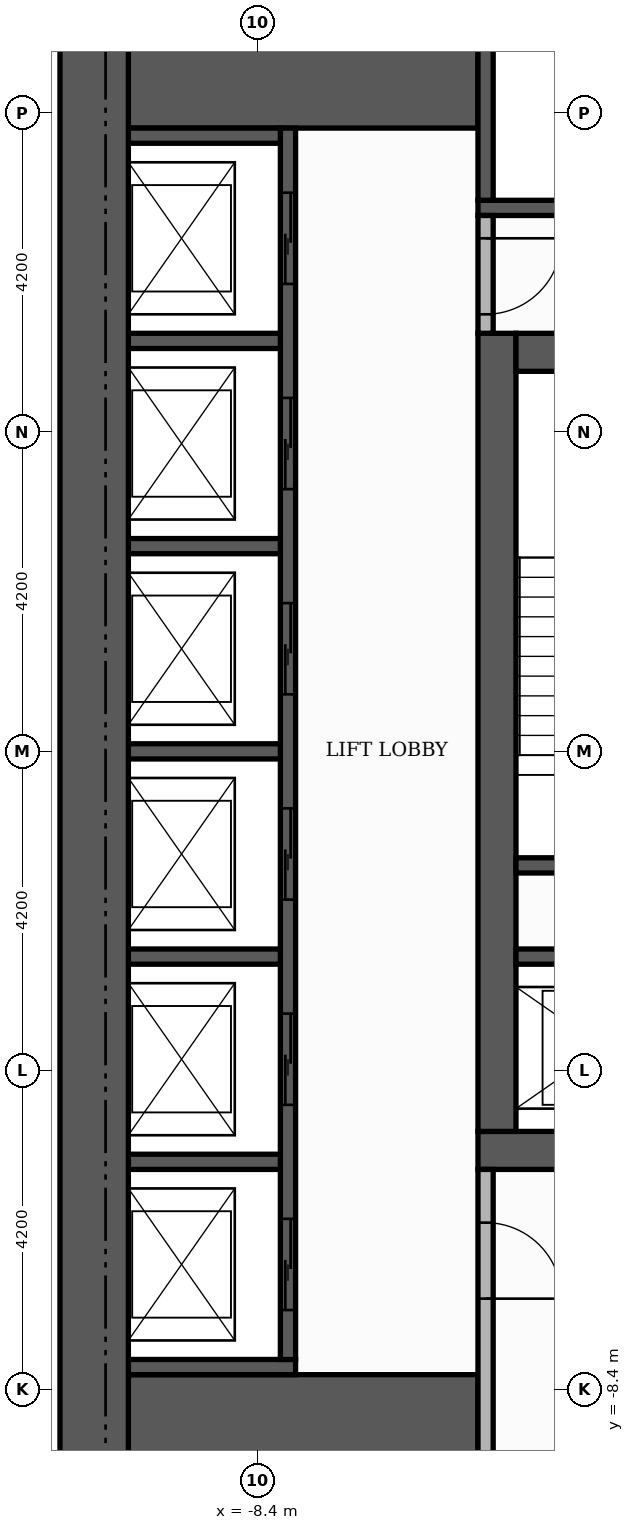
"""IFC4 building model, lengths in metres.
Left out: names, types, materials, properties, quantities, classifications, styles, units other than length and angle.
Written with IfcOpenShell. Run it as: python <this file> out.ifc"""

import sys

from ifc_helpers import new_model, si_unit, direction, frame, frame_2d, origin, place, context, subcontext, project, spatial, rectangle, extrude, element, fill, save


model = new_model("IFC4")
c1 = context("Model", 3, precision=1e-05, world=origin(), true_north=direction((0.0, 1.0)))
c2 = subcontext(c1, "Body", "Model", "MODEL_VIEW")
j1 = project(units=[si_unit("LENGTHUNIT", "METRE"), si_unit("PLANEANGLEUNIT", "RADIAN")], contexts=[c1])
p1 = place(None, origin())
s1 = spatial("IfcSite", under=j1, at=p1, CompositionType="ELEMENT")
p2 = place(p1, origin())
s2 = spatial("IfcBuilding", under=s1, at=p2, CompositionType="ELEMENT")
p3 = place(p2, frame((0.0, 0.0, 118.2)))
s3 = spatial("IfcBuildingStorey", under=s2, at=p3, CompositionType="ELEMENT", Elevation=118.2)
p4 = place(p3, frame((-5.5, -5.25, 0.0), z_axis=(0.0, 0.0, 1.0), x_axis=(1.0, 0.0, 0.0)))
e1 = element("IfcWall", 1, at=p4, inside=s3, PredefinedType="SHEAR", context=c2, shape_type="SweptSolid", body=[
    extrude(rectangle(XDim=11.0, YDim=0.5, at=frame_2d((5.5, 0.0))), origin(), (0.0, 0.0, 1.0), 3.48),
])
p5 = place(p4, frame((4.9, 0.0, 0.0)))
e2 = element("IfcOpeningElement", 2, at=p5, cuts=e1, PredefinedType="OPENING", context=c2, shape_type="SweptSolid", body=[
    extrude(rectangle(XDim=1.2, YDim=2.1, at=frame_2d((0.6, 1.05))), frame((0.0, 0.26, 0.0), z_axis=(0.0, -1.0, 0.0), x_axis=(1.0, 0.0, 0.0)), (0.0, 0.0, 1.0), 0.52),
])
p6 = place(p3, frame((-5.25, -5.0, 0.0), z_axis=(0.0, 0.0, 1.0), x_axis=(0.0, 1.0, 0.0)))
e3 = element("IfcWall", 3, at=p6, inside=s3, PredefinedType="SHEAR", context=c2, shape_type="SweptSolid", body=[
    extrude(rectangle(XDim=10.5, YDim=0.5, at=frame_2d((5.25, 0.0))), origin(), (0.0, 0.0, 1.0), 3.48),
])
p7 = place(p3, frame((-5.0, 5.25, 0.0), z_axis=(0.0, 0.0, 1.0), x_axis=(1.0, 0.0, 0.0)))
e4 = element("IfcWall", 4, at=p7, inside=s3, PredefinedType="SHEAR", context=c2, shape_type="SweptSolid", body=[
    extrude(rectangle(XDim=10.0, YDim=0.5, at=frame_2d((5.0, 0.0))), origin(), (0.0, 0.0, 1.0), 3.48),
])
p8 = place(p7, frame((4.4, 0.0, 0.0)))
e5 = element("IfcOpeningElement", 5, at=p8, cuts=e4, PredefinedType="OPENING", context=c2, shape_type="SweptSolid", body=[
    extrude(rectangle(XDim=1.2, YDim=2.1, at=frame_2d((0.6, 1.05))), frame((0.0, 0.26, 0.0), z_axis=(0.0, -1.0, 0.0), x_axis=(1.0, 0.0, 0.0)), (0.0, 0.0, 1.0), 0.52),
])
for number, where, z_axis, x_axis in (
    (6, (-10.1, -9.15, 0.0), (0.0, 0.0, 1.0), (1.0, 0.0, 0.0)),
    (7, (-10.1, 9.15, 0.0), (0.0, 0.0, 1.0), (1.0, 0.0, 0.0)),
):
    element("IfcWall", number, at=place(p3, frame(where, z_axis=z_axis, x_axis=x_axis)), inside=s3, PredefinedType="SHEAR", context=c2, shape_type="SweptSolid", body=[
        extrude(rectangle(XDim=4.6, YDim=1.9, at=frame_2d((2.3, 0.0))), origin(), (0.0, 0.0, 1.0), 3.48),
    ])
p9 = place(p3, frame((-5.0, -1.5, 0.0), z_axis=(0.0, 0.0, 1.0), x_axis=(1.0, 0.0, 0.0)))
e8 = element("IfcWall", 8, at=p9, inside=s3, PredefinedType="SHEAR", context=c2, shape_type="SweptSolid", body=[
    extrude(rectangle(XDim=3.05, YDim=0.2, at=frame_2d((1.525, 0.0))), origin(), (0.0, 0.0, 1.0), 3.48),
])
p10 = place(p3, frame((-5.5, 7.15, 0.0), z_axis=(0.0, 0.0, 1.0), x_axis=(1.0, 0.0, 0.0)))
e9 = element("IfcWall", 9, at=p10, inside=s3, PredefinedType="SHEAR", context=c2, shape_type="SweptSolid", body=[
    extrude(rectangle(XDim=6.8, YDim=0.2, at=frame_2d((3.4, 0.0))), origin(), (0.0, 0.0, 1.0), 3.48),
])
p11 = place(p3, frame((-5.4, 7.25, 0.0), z_axis=(0.0, 0.0, 1.0), x_axis=(0.0, 1.0, 0.0)))
e10 = element("IfcWall", 10, at=p11, inside=s3, PredefinedType="SHEAR", context=c2, shape_type="SweptSolid", body=[
    extrude(rectangle(XDim=2.85, YDim=0.2, at=frame_2d((1.425, 0.0))), origin(), (0.0, 0.0, 1.0), 3.48),
])
p12 = place(p3, frame((-10.1, -8.1, 0.0), z_axis=(0.0, 0.0, 1.0), x_axis=(1.0, 0.0, 0.0)))
e11 = element("IfcWall", 11, at=p12, inside=s3, PredefinedType="SHEAR", context=c2, shape_type="SweptSolid", body=[
    extrude(rectangle(XDim=2.2, YDim=0.2, at=frame_2d((1.1, 0.0))), origin(), (0.0, 0.0, 1.0), 3.48),
])
p13 = place(p3, frame((-8.0, -8.0, 0.0), z_axis=(0.0, 0.0, 1.0), x_axis=(0.0, 1.0, 0.0)))
e12 = element("IfcWall", 12, at=p13, inside=s3, PredefinedType="SHEAR", context=c2, shape_type="SweptSolid", body=[
    extrude(rectangle(XDim=16.2, YDim=0.2, at=frame_2d((8.1, 0.0))), origin(), (0.0, 0.0, 1.0), 3.48),
])
p14 = place(p13, frame((0.65, 0.0, 0.0)))
e13 = element("IfcOpeningElement", 13, at=p14, cuts=e12, PredefinedType="OPENING", context=c2, shape_type="SweptSolid", body=[
    extrude(rectangle(XDim=1.2, YDim=2.1, at=frame_2d((0.6, 1.05))), frame((0.0, 0.11, 0.0), z_axis=(0.0, -1.0, 0.0), x_axis=(1.0, 0.0, 0.0)), (0.0, 0.0, 1.0), 0.22),
])
p15 = place(p13, frame((3.35, 0.0, 0.0)))
e14 = element("IfcOpeningElement", 14, at=p15, cuts=e12, PredefinedType="OPENING", context=c2, shape_type="SweptSolid", body=[
    extrude(rectangle(XDim=1.2, YDim=2.1, at=frame_2d((0.6, 1.05))), frame((0.0, 0.11, 0.0), z_axis=(0.0, -1.0, 0.0), x_axis=(1.0, 0.0, 0.0)), (0.0, 0.0, 1.0), 0.22),
])
p16 = place(p13, frame((6.05, 0.0, 0.0)))
e15 = element("IfcOpeningElement", 15, at=p16, cuts=e12, PredefinedType="OPENING", context=c2, shape_type="SweptSolid", body=[
    extrude(rectangle(XDim=1.2, YDim=2.1, at=frame_2d((0.6, 1.05))), frame((0.0, 0.11, 0.0), z_axis=(0.0, -1.0, 0.0), x_axis=(1.0, 0.0, 0.0)), (0.0, 0.0, 1.0), 0.22),
])
p17 = place(p13, frame((8.75, 0.0, 0.0)))
e16 = element("IfcOpeningElement", 16, at=p17, cuts=e12, PredefinedType="OPENING", context=c2, shape_type="SweptSolid", body=[
    extrude(rectangle(XDim=1.2, YDim=2.1, at=frame_2d((0.6, 1.05))), frame((0.0, 0.11, 0.0), z_axis=(0.0, -1.0, 0.0), x_axis=(1.0, 0.0, 0.0)), (0.0, 0.0, 1.0), 0.22),
])
p18 = place(p13, frame((11.45, 0.0, 0.0)))
e17 = element("IfcOpeningElement", 17, at=p18, cuts=e12, PredefinedType="OPENING", context=c2, shape_type="SweptSolid", body=[
    extrude(rectangle(XDim=1.2, YDim=2.1, at=frame_2d((0.6, 1.05))), frame((0.0, 0.11, 0.0), z_axis=(0.0, -1.0, 0.0), x_axis=(1.0, 0.0, 0.0)), (0.0, 0.0, 1.0), 0.22),
])
p19 = place(p13, frame((14.15, 0.0, 0.0)))
e18 = element("IfcOpeningElement", 18, at=p19, cuts=e12, PredefinedType="OPENING", context=c2, shape_type="SweptSolid", body=[
    extrude(rectangle(XDim=1.2, YDim=2.1, at=frame_2d((0.6, 1.05))), frame((0.0, 0.11, 0.0), z_axis=(0.0, -1.0, 0.0), x_axis=(1.0, 0.0, 0.0)), (0.0, 0.0, 1.0), 0.22),
])
for number, where, z_axis, x_axis in (
    (19, (-10.1, -5.4, 0.0), (0.0, 0.0, 1.0), (1.0, 0.0, 0.0)),
    (20, (-10.1, -2.7, 0.0), (0.0, 0.0, 1.0), (1.0, 0.0, 0.0)),
):
    element("IfcWall", number, at=place(p3, frame(where, z_axis=z_axis, x_axis=x_axis)), inside=s3, PredefinedType="SHEAR", context=c2, shape_type="SweptSolid", body=[
        extrude(rectangle(XDim=2.0, YDim=0.2, at=frame_2d((1.0, 0.0))), origin(), (0.0, 0.0, 1.0), 3.48),
    ])
p20 = place(p3, frame((-5.0, -2.7, 0.0), z_axis=(0.0, 0.0, 1.0), x_axis=(1.0, 0.0, 0.0)))
e21 = element("IfcWall", 21, at=p20, inside=s3, PredefinedType="SHEAR", context=c2, shape_type="SweptSolid", body=[
    extrude(rectangle(XDim=2.85, YDim=0.2, at=frame_2d((1.425, 0.0))), origin(), (0.0, 0.0, 1.0), 3.48),
])
for number, where, z_axis, x_axis in (
    (22, (-10.1, 0.0, 0.0), (0.0, 0.0, 1.0), (1.0, 0.0, 0.0)),
    (23, (-10.1, 2.7, 0.0), (0.0, 0.0, 1.0), (1.0, 0.0, 0.0)),
    (24, (-10.1, 5.4, 0.0), (0.0, 0.0, 1.0), (1.0, 0.0, 0.0)),
    (25, (-10.1, 8.1, 0.0), (0.0, 0.0, 1.0), (1.0, 0.0, 0.0)),
):
    element("IfcWall", number, at=place(p3, frame(where, z_axis=z_axis, x_axis=x_axis)), inside=s3, PredefinedType="SHEAR", context=c2, shape_type="SweptSolid", body=[
        extrude(rectangle(XDim=2.0, YDim=0.2, at=frame_2d((1.0, 0.0))), origin(), (0.0, 0.0, 1.0), 3.48),
    ])
p21 = place(p3, frame((-10.55, -10.1, 0.0), z_axis=(0.0, 0.0, 1.0), x_axis=(0.0, 1.0, 0.0)))
e26 = element("IfcWall", 26, at=p21, inside=s3, PredefinedType="SHEAR", context=c2, shape_type="SweptSolid", body=[
    extrude(rectangle(XDim=20.2, YDim=0.9, at=frame_2d((10.1, 0.0))), origin(), (0.0, 0.0, 1.0), 3.48),
])
p22 = place(p3, frame((-5.4, -10.1, 0.0), z_axis=(0.0, 0.0, 1.0), x_axis=(0.0, 1.0, 0.0)))
e27 = element("IfcWall", 27, at=p22, inside=s3, PredefinedType="PARTITIONING", context=c2, shape_type="SweptSolid", body=[
    extrude(rectangle(XDim=4.6, YDim=0.2, at=frame_2d((2.3, 0.0))), origin(), (0.0, 0.0, 1.0), 3.48),
])
p23 = place(p22, frame((2.9, 0.0, 0.0)))
e28 = element("IfcOpeningElement", 28, at=p23, cuts=e27, PredefinedType="OPENING", context=c2, shape_type="SweptSolid", body=[
    extrude(rectangle(XDim=1.0, YDim=2.1, at=frame_2d((0.5, 1.05))), frame((0.0, 0.11, 0.0), z_axis=(0.0, -1.0, 0.0), x_axis=(1.0, 0.0, 0.0)), (0.0, 0.0, 1.0), 0.22),
])
p24 = place(p3, frame((-5.4, 5.5, 0.0), z_axis=(0.0, 0.0, 1.0), x_axis=(0.0, 1.0, 0.0)))
e29 = element("IfcWall", 29, at=p24, inside=s3, PredefinedType="PARTITIONING", context=c2, shape_type="SweptSolid", body=[
    extrude(rectangle(XDim=1.55, YDim=0.2, at=frame_2d((0.775, 0.0))), origin(), (0.0, 0.0, 1.0), 3.48),
])
p25 = place(p24, frame((0.25, 0.0, 0.0)))
e30 = element("IfcOpeningElement", 30, at=p25, cuts=e29, PredefinedType="OPENING", context=c2, shape_type="SweptSolid", body=[
    extrude(rectangle(XDim=1.0, YDim=2.1, at=frame_2d((0.5, 1.05))), frame((0.0, 0.11, 0.0), z_axis=(0.0, -1.0, 0.0), x_axis=(1.0, 0.0, 0.0)), (0.0, 0.0, 1.0), 0.22),
])
p26 = place(p14, origin())
e31 = element("IfcDoor", 31, at=p26, inside=s3, OperationType="SLIDING_TO_LEFT", PredefinedType="DOOR", context=c2, shape_type="SweptSolid", body=[
    extrude(rectangle(XDim=1.2, YDim=2.1, at=frame_2d((0.6, 1.05))), frame((0.0, 0.025, 0.0), z_axis=(0.0, -1.0, 0.0), x_axis=(1.0, 0.0, 0.0)), (0.0, 0.0, 1.0), 0.05),
])
fill(e13, e31)
p27 = place(p15, origin())
e32 = element("IfcDoor", 32, at=p27, inside=s3, OperationType="SLIDING_TO_LEFT", PredefinedType="DOOR", context=c2, shape_type="SweptSolid", body=[
    extrude(rectangle(XDim=1.2, YDim=2.1, at=frame_2d((0.6, 1.05))), frame((0.0, 0.025, 0.0), z_axis=(0.0, -1.0, 0.0), x_axis=(1.0, 0.0, 0.0)), (0.0, 0.0, 1.0), 0.05),
])
fill(e14, e32)
p28 = place(p16, origin())
e33 = element("IfcDoor", 33, at=p28, inside=s3, OperationType="SLIDING_TO_LEFT", PredefinedType="DOOR", context=c2, shape_type="SweptSolid", body=[
    extrude(rectangle(XDim=1.2, YDim=2.1, at=frame_2d((0.6, 1.05))), frame((0.0, 0.025, 0.0), z_axis=(0.0, -1.0, 0.0), x_axis=(1.0, 0.0, 0.0)), (0.0, 0.0, 1.0), 0.05),
])
fill(e15, e33)
p29 = place(p17, origin())
e34 = element("IfcDoor", 34, at=p29, inside=s3, OperationType="SLIDING_TO_LEFT", PredefinedType="DOOR", context=c2, shape_type="SweptSolid", body=[
    extrude(rectangle(XDim=1.2, YDim=2.1, at=frame_2d((0.6, 1.05))), frame((0.0, 0.025, 0.0), z_axis=(0.0, -1.0, 0.0), x_axis=(1.0, 0.0, 0.0)), (0.0, 0.0, 1.0), 0.05),
])
fill(e16, e34)
p30 = place(p18, origin())
e35 = element("IfcDoor", 35, at=p30, inside=s3, OperationType="SLIDING_TO_LEFT", PredefinedType="DOOR", context=c2, shape_type="SweptSolid", body=[
    extrude(rectangle(XDim=1.2, YDim=2.1, at=frame_2d((0.6, 1.05))), frame((0.0, 0.025, 0.0), z_axis=(0.0, -1.0, 0.0), x_axis=(1.0, 0.0, 0.0)), (0.0, 0.0, 1.0), 0.05),
])
fill(e17, e35)
p31 = place(p19, origin())
e36 = element("IfcDoor", 36, at=p31, inside=s3, OperationType="SLIDING_TO_LEFT", PredefinedType="DOOR", context=c2, shape_type="SweptSolid", body=[
    extrude(rectangle(XDim=1.2, YDim=2.1, at=frame_2d((0.6, 1.05))), frame((0.0, 0.025, 0.0), z_axis=(0.0, -1.0, 0.0), x_axis=(1.0, 0.0, 0.0)), (0.0, 0.0, 1.0), 0.05),
])
fill(e18, e36)
p32 = place(p25, frame((1.0, 0.0, 0.0), z_axis=(0.0, 0.0, 1.0), x_axis=(-1.0, 0.0, 0.0)))
e37 = element("IfcDoor", 37, at=p32, inside=s3, OperationType="SINGLE_SWING_RIGHT", PredefinedType="DOOR", context=c2, shape_type="SweptSolid", body=[
    extrude(rectangle(XDim=1.0, YDim=2.1, at=frame_2d((0.5, 1.05))), frame((0.0, 0.025, 0.0), z_axis=(0.0, -1.0, 0.0), x_axis=(1.0, 0.0, 0.0)), (0.0, 0.0, 1.0), 0.05),
])
fill(e30, e37)
p33 = place(p23, frame((1.0, 0.0, 0.0), z_axis=(0.0, 0.0, 1.0), x_axis=(-1.0, 0.0, 0.0)))
e38 = element("IfcDoor", 38, at=p33, inside=s3, OperationType="SINGLE_SWING_LEFT", PredefinedType="DOOR", context=c2, shape_type="SweptSolid", body=[
    extrude(rectangle(XDim=1.0, YDim=2.1, at=frame_2d((0.5, 1.05))), frame((0.0, 0.025, 0.0), z_axis=(0.0, -1.0, 0.0), x_axis=(1.0, 0.0, 0.0)), (0.0, 0.0, 1.0), 0.05),
])
fill(e28, e38)
save(model, sys.argv[1])
